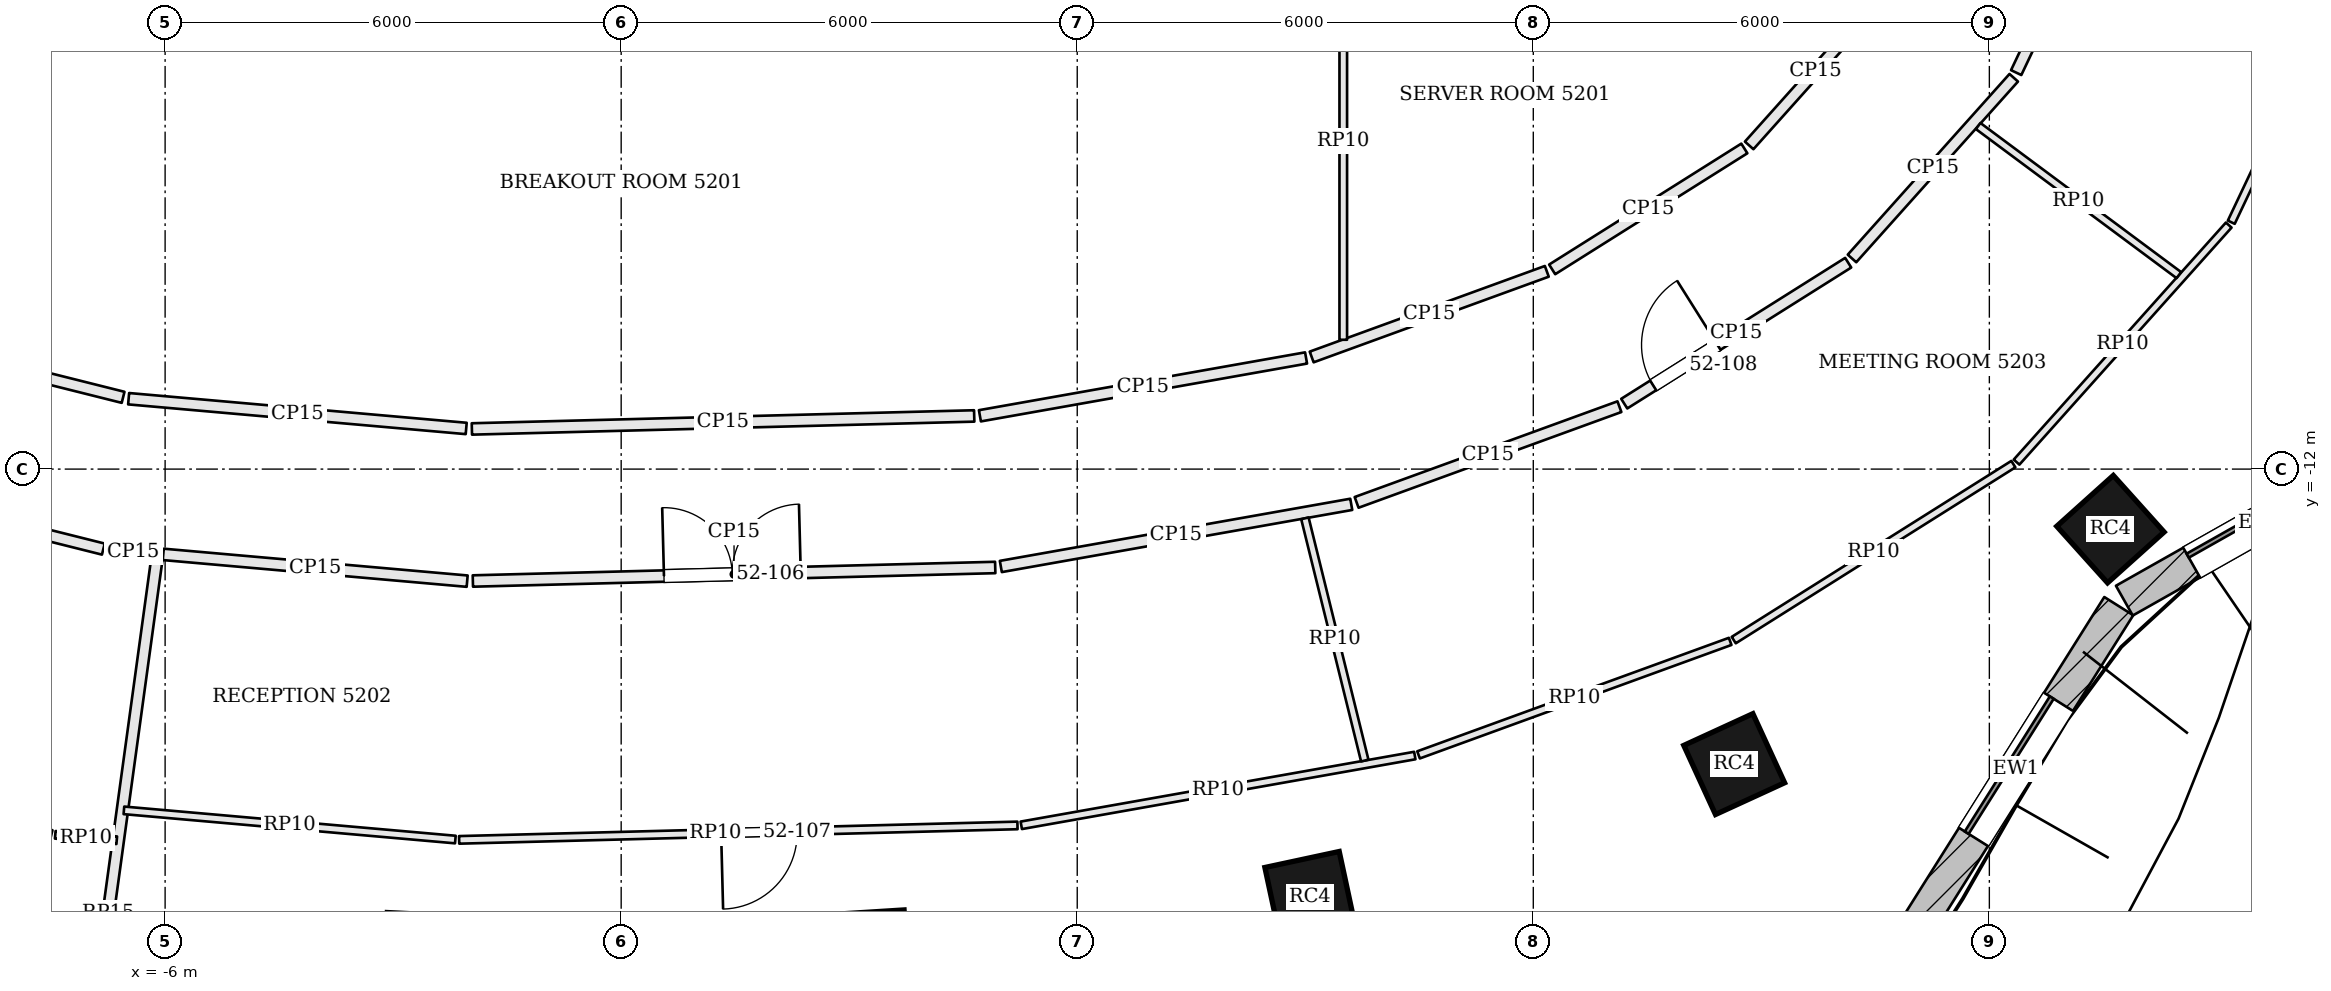
"""IFC4 building model, lengths in metres.
Left out: names, types, materials, properties, quantities, classifications, styles, units other than length and angle.
Written with IfcOpenShell. Run it as: python <this file> out.ifc"""

import sys

from ifc_helpers import new_model, si_unit, direction, frame, frame_2d, origin, origin_2d, place, context, subcontext, project, spatial, rectangle, extrude, element, fill, save


model = new_model("IFC4")
c1 = context("Model", 3, precision=1e-05, world=origin(), true_north=direction((0.0, 1.0)))
c2 = subcontext(c1, "Body", "Model", "MODEL_VIEW")
j1 = project(units=[si_unit("LENGTHUNIT", "METRE"), si_unit("PLANEANGLEUNIT", "RADIAN")], contexts=[c1])
p1 = place(None, origin())
s1 = spatial("IfcSite", under=j1, at=p1, CompositionType="ELEMENT")
p2 = place(p1, origin())
s2 = spatial("IfcBuilding", under=s1, at=p2, CompositionType="ELEMENT")
p3 = place(p2, frame((0.0, 0.0, 213.0)))
s3 = spatial("IfcBuildingStorey", under=s2, at=p3, CompositionType="ELEMENT", Elevation=213.0)
for number, where, z_axis, x_axis in (
    (1, (3.254, -18.33, 0.0), (0.0, 0.0, 1.0), (0.998, 0.063, 0.0)),
    (2, (9.063, -17.625, 0.0), (0.0, 0.0, 1.0), (0.978, 0.21, 0.0)),
    (3, (14.643, -15.881, 0.0), (0.0, 0.0, 1.0), (0.909, 0.417, 0.0)),
    (4, (19.593, -12.79, 0.0), (0.0, 0.0, 1.0), (0.744, 0.668, 0.0)),
):
    element("IfcColumn", number, at=place(p3, frame(where, z_axis=z_axis, x_axis=x_axis)), inside=s3, PredefinedType="COLUMN", context=c2, shape_type="SweptSolid", body=[
        extrude(rectangle(XDim=1.0, YDim=1.0, at=origin_2d()), origin(), (0.0, 0.0, 1.0), 3.9),
    ])
p4 = place(p3, frame((16.998, -18.099, 0.0), z_axis=(0.0, 0.0, 1.0), x_axis=(0.532745661304, 0.846275404559, 0.0)))
e5 = element("IfcWall", 5, at=p4, inside=s3, PredefinedType="SOLIDWALL", context=c2, shape_type="SweptSolid", body=[
    extrude(rectangle(XDim=5.076, YDim=0.45, at=frame_2d((2.538, 0.0))), origin(), (0.0, 0.0, 1.0), 3.6),
])
p5 = place(p4, frame((1.488, 0.0, 0.9)))
e6 = element("IfcOpeningElement", 6, at=p5, cuts=e5, PredefinedType="OPENING", context=c2, shape_type="SweptSolid", body=[
    extrude(rectangle(XDim=2.1, YDim=1.8, at=frame_2d((1.05, 0.9))), frame((0.0, 0.235, 0.0), z_axis=(0.0, -1.0, 0.0), x_axis=(1.0, 0.0, 0.0)), (0.0, 0.0, 1.0), 0.47),
])
p6 = place(p3, frame((19.776, -13.731, 0.0), z_axis=(0.0, 0.0, 1.0), x_axis=(0.870610133829, 0.491973571318, 0.0)))
e7 = element("IfcWall", 7, at=p6, inside=s3, PredefinedType="SOLIDWALL", context=c2, shape_type="SweptSolid", body=[
    extrude(rectangle(XDim=4.134, YDim=0.45, at=frame_2d((2.067, 0.0))), origin(), (0.0, 0.0, 1.0), 3.6),
])
p7 = place(p6, frame((1.017, 0.0, 0.9)))
e8 = element("IfcOpeningElement", 8, at=p7, cuts=e7, PredefinedType="OPENING", context=c2, shape_type="SweptSolid", body=[
    extrude(rectangle(XDim=2.1, YDim=1.8, at=frame_2d((1.05, 0.9))), frame((0.0, 0.235, 0.0), z_axis=(0.0, -1.0, 0.0), x_axis=(1.0, 0.0, 0.0)), (0.0, 0.0, 1.0), 0.47),
])
p8 = place(p3, frame((-11.319, -11.923, 0.0), z_axis=(0.0, 0.0, 1.0), x_axis=(0.969990815038, -0.243141561114, 0.0)))
e9 = element("IfcWall", 9, at=p8, inside=s3, PredefinedType="PARTITIONING", context=c2, shape_type="SweptSolid", body=[
    extrude(rectangle(XDim=4.645, YDim=0.15, at=frame_2d((2.323, 0.0))), origin(), (0.0, 0.0, 1.0), 2.984),
])
p9 = place(p8, frame((1.85, 0.0, 0.0)))
e10 = element("IfcOpeningElement", 10, at=p9, cuts=e9, PredefinedType="OPENING", context=c2, shape_type="SweptSolid", body=[
    extrude(rectangle(XDim=1.0, YDim=2.1, at=frame_2d((0.5, 1.05))), frame((0.0, 0.085, 0.0), z_axis=(0.0, -1.0, 0.0), x_axis=(1.0, 0.0, 0.0)), (0.0, 0.0, 1.0), 0.17),
])
p10 = place(p3, frame((-6.738, -13.059, 0.0), z_axis=(0.0, 0.0, 1.0), x_axis=(0.996163093105, -0.087516238126, 0.0)))
e11 = element("IfcWall", 11, at=p10, inside=s3, PredefinedType="PARTITIONING", context=c2, shape_type="SweptSolid", body=[
    extrude(rectangle(XDim=0.642, YDim=0.15, at=frame_2d((0.321, 0.0))), origin(), (0.0, 0.0, 1.0), 2.984),
])
p11 = place(p3, frame((-7.385, -22.485, 0.0), z_axis=(0.0, 0.0, 1.0), x_axis=(0.135958487289, 0.990714534936, 0.0)))
e12 = element("IfcWall", 12, at=p11, inside=s3, PredefinedType="PARTITIONING", context=c2, shape_type="SweptSolid", body=[
    extrude(rectangle(XDim=9.383, YDim=0.15, at=frame_2d((4.691, 0.0))), origin(), (0.0, 0.0, 1.0), 3.084),
])
p12 = place(p3, frame((-6.024, -13.122, 0.0), z_axis=(0.0, 0.0, 1.0), x_axis=(0.996140650131, -0.087771323084, 0.0)))
e13 = element("IfcWall", 13, at=p12, inside=s3, PredefinedType="PARTITIONING", context=c2, shape_type="SweptSolid", body=[
    extrude(rectangle(XDim=4.014, YDim=0.15, at=frame_2d((2.007, 0.0))), origin(), (0.0, 0.0, 1.0), 2.984),
])
p13 = place(p3, frame((-1.951, -13.472, 0.0), z_axis=(0.0, 0.0, 1.0), x_axis=(0.999663898238, 0.025924709429, 0.0)))
e14 = element("IfcWall", 14, at=p13, inside=s3, PredefinedType="PARTITIONING", context=c2, shape_type="SweptSolid", body=[
    extrude(rectangle(XDim=6.875, YDim=0.15, at=frame_2d((3.437, 0.0))), origin(), (0.0, 0.0, 1.0), 2.984),
])
p14 = place(p13, frame((2.515, 0.0, 0.0)))
e15 = element("IfcOpeningElement", 15, at=p14, cuts=e14, PredefinedType="OPENING", context=c2, shape_type="SweptSolid", body=[
    extrude(rectangle(XDim=1.8, YDim=2.1, at=frame_2d((0.9, 1.05))), frame((0.0, 0.085, 0.0), z_axis=(0.0, -1.0, 0.0), x_axis=(1.0, 0.0, 0.0)), (0.0, 0.0, 1.0), 0.17),
])
p15 = place(p3, frame((4.995, -13.281, 0.0), z_axis=(0.0, 0.0, 1.0), x_axis=(0.98463411377, 0.174630071865, 0.0)))
e16 = element("IfcWall", 16, at=p15, inside=s3, PredefinedType="PARTITIONING", context=c2, shape_type="SweptSolid", body=[
    extrude(rectangle(XDim=4.682, YDim=0.15, at=frame_2d((2.341, 0.0))), origin(), (0.0, 0.0, 1.0), 2.984),
])
p16 = place(p3, frame((9.676, -12.438, 0.0), z_axis=(0.0, 0.0, 1.0), x_axis=(0.939640289748, 0.342163887461, 0.0)))
e17 = element("IfcWall", 17, at=p16, inside=s3, PredefinedType="PARTITIONING", context=c2, shape_type="SweptSolid", body=[
    extrude(rectangle(XDim=3.68, YDim=0.15, at=frame_2d((1.84, 0.0))), origin(), (0.0, 0.0, 1.0), 2.984),
])
p17 = place(p3, frame((13.197, -11.139, 0.0), z_axis=(0.0, 0.0, 1.0), x_axis=(0.846390903833, 0.532562144644, 0.0)))
e18 = element("IfcWall", 18, at=p17, inside=s3, PredefinedType="PARTITIONING", context=c2, shape_type="SweptSolid", body=[
    extrude(rectangle(XDim=3.481, YDim=0.15, at=frame_2d((1.741, 0.0))), origin(), (0.0, 0.0, 1.0), 2.984),
])
p18 = place(p17, frame((0.45, 0.0, 0.0)))
e19 = element("IfcOpeningElement", 19, at=p18, cuts=e18, PredefinedType="OPENING", context=c2, shape_type="SweptSolid", body=[
    extrude(rectangle(XDim=1.0, YDim=2.4, at=frame_2d((0.5, 1.2))), frame((0.0, 0.085, 0.0), z_axis=(0.0, -1.0, 0.0), x_axis=(1.0, 0.0, 0.0)), (0.0, 0.0, 1.0), 0.17),
])
p19 = place(p3, frame((16.193, -9.229, 0.0), z_axis=(0.0, 0.0, 1.0), x_axis=(0.666882089048, 0.745163256815, 0.0)))
e20 = element("IfcWall", 20, at=p19, inside=s3, PredefinedType="PARTITIONING", context=c2, shape_type="SweptSolid", body=[
    extrude(rectangle(XDim=3.19, YDim=0.15, at=frame_2d((1.595, 0.0))), origin(), (0.0, 0.0, 1.0), 2.984),
])
p20 = place(p3, frame((18.353, -6.784, 0.0), z_axis=(0.0, 0.0, 1.0), x_axis=(0.428086344739, 0.903737838894, 0.0)))
e21 = element("IfcWall", 21, at=p20, inside=s3, PredefinedType="PARTITIONING", context=c2, shape_type="SweptSolid", body=[
    extrude(rectangle(XDim=2.3, YDim=0.15, at=frame_2d((1.15, 0.0))), origin(), (0.0, 0.0, 1.0), 2.984),
])
p21 = place(p3, frame((16.587, -5.789, 0.0), z_axis=(0.0, 0.0, 1.0), x_axis=(-0.666887460656, -0.745158449472, 0.0)))
e22 = element("IfcWall", 22, at=p21, inside=s3, PredefinedType="PARTITIONING", context=c2, shape_type="SweptSolid", body=[
    extrude(rectangle(XDim=2.62, YDim=0.15, at=frame_2d((1.31, 0.0))), origin(), (0.0, 0.0, 1.0), 2.984),
])
p22 = place(p3, frame((14.777, -7.781, 0.0), z_axis=(0.0, 0.0, 1.0), x_axis=(-0.846359741043, -0.532611667862, 0.0)))
e23 = element("IfcWall", 23, at=p22, inside=s3, PredefinedType="PARTITIONING", context=c2, shape_type="SweptSolid", body=[
    extrude(rectangle(XDim=2.987, YDim=0.15, at=frame_2d((1.494, 0.0))), origin(), (0.0, 0.0, 1.0), 2.984),
])
p23 = place(p3, frame((12.178, -9.398, 0.0), z_axis=(0.0, 0.0, 1.0), x_axis=(-0.939609240084, -0.342249143093, 0.0)))
e24 = element("IfcWall", 24, at=p23, inside=s3, PredefinedType="PARTITIONING", context=c2, shape_type="SweptSolid", body=[
    extrude(rectangle(XDim=3.292, YDim=0.15, at=frame_2d((1.646, 0.0))), origin(), (0.0, 0.0, 1.0), 2.984),
])
p24 = place(p3, frame((9.01, -10.538, 0.0), z_axis=(0.0, 0.0, 1.0), x_axis=(-0.984645638575, -0.174565077936, 0.0)))
e25 = element("IfcWall", 25, at=p24, inside=s3, PredefinedType="PARTITIONING", context=c2, shape_type="SweptSolid", body=[
    extrude(rectangle(XDim=4.358, YDim=0.15, at=frame_2d((2.179, 0.0))), origin(), (0.0, 0.0, 1.0), 2.984),
])
p25 = place(p3, frame((4.645, -11.301, 0.0), z_axis=(0.0, 0.0, 1.0), x_axis=(-0.9996648469, -0.02588810291, 0.0)))
e26 = element("IfcWall", 26, at=p25, inside=s3, PredefinedType="PARTITIONING", context=c2, shape_type="SweptSolid", body=[
    extrude(rectangle(XDim=6.611, YDim=0.15, at=frame_2d((3.305, 0.0))), origin(), (0.0, 0.0, 1.0), 2.984),
])
p26 = place(p3, frame((-2.039, -11.465, 0.0), z_axis=(0.0, 0.0, 1.0), x_axis=(-0.996139855484, 0.087780341286, 0.0)))
e27 = element("IfcWall", 27, at=p26, inside=s3, PredefinedType="PARTITIONING", context=c2, shape_type="SweptSolid", body=[
    extrude(rectangle(XDim=4.458, YDim=0.15, at=frame_2d((2.229, 0.0))), origin(), (0.0, 0.0, 1.0), 2.984),
])
p27 = place(p3, frame((-6.553, -11.056, 0.0), z_axis=(0.0, 0.0, 1.0), x_axis=(-0.970004917182, 0.243085294995, 0.0)))
e28 = element("IfcWall", 28, at=p27, inside=s3, PredefinedType="PARTITIONING", context=c2, shape_type="SweptSolid", body=[
    extrude(rectangle(XDim=4.284, YDim=0.15, at=frame_2d((2.142, 0.0))), origin(), (0.0, 0.0, 1.0), 2.984),
])
p28 = place(p3, frame((-6.636, -16.883, 0.0), z_axis=(0.0, 0.0, 1.0), x_axis=(-0.996140679017, 0.087770995254, 0.0)))
e29 = element("IfcWall", 29, at=p28, inside=s3, PredefinedType="PARTITIONING", context=c2, shape_type="SweptSolid", body=[
    extrude(rectangle(XDim=0.812, YDim=0.1, at=frame_2d((0.406, 0.0))), origin(), (0.0, 0.0, 1.0), 2.984),
])
p29 = place(p3, frame((22.537, -5.893, 0.0), z_axis=(0.0, 0.0, 1.0), x_axis=(-0.428099612517, -0.903731554037, 0.0)))
e30 = element("IfcWall", 30, at=p29, inside=s3, PredefinedType="PARTITIONING", context=c2, shape_type="SweptSolid", body=[
    extrude(rectangle(XDim=3.164, YDim=0.1, at=frame_2d((1.582, 0.0))), origin(), (0.0, 0.0, 1.0), 2.984),
])
p30 = place(p3, frame((21.149, -8.789, 0.0), z_axis=(0.0, 0.0, 1.0), x_axis=(-0.666915902537, -0.745132994132, 0.0)))
e31 = element("IfcWall", 31, at=p30, inside=s3, PredefinedType="PARTITIONING", context=c2, shape_type="SweptSolid", body=[
    extrude(rectangle(XDim=4.186, YDim=0.1, at=frame_2d((2.093, 0.0))), origin(), (0.0, 0.0, 1.0), 2.984),
])
p31 = place(p3, frame((18.316, -11.935, 0.0), z_axis=(0.0, 0.0, 1.0), x_axis=(-0.84637539713, -0.532586788358, 0.0)))
e32 = element("IfcWall", 32, at=p31, inside=s3, PredefinedType="PARTITIONING", context=c2, shape_type="SweptSolid", body=[
    extrude(rectangle(XDim=4.346, YDim=0.1, at=frame_2d((2.173, 0.0))), origin(), (0.0, 0.0, 1.0), 2.984),
])
p32 = place(p3, frame((14.59, -14.267, 0.0), z_axis=(0.0, 0.0, 1.0), x_axis=(-0.939623405418, -0.342210251148, 0.0)))
e33 = element("IfcWall", 33, at=p32, inside=s3, PredefinedType="PARTITIONING", context=c2, shape_type="SweptSolid", body=[
    extrude(rectangle(XDim=4.363, YDim=0.1, at=frame_2d((2.182, 0.0))), origin(), (0.0, 0.0, 1.0), 2.984),
])
p33 = place(p3, frame((10.441, -15.769, 0.0), z_axis=(0.0, 0.0, 1.0), x_axis=(-0.984642067447, -0.174585219919, 0.0)))
e34 = element("IfcWall", 34, at=p33, inside=s3, PredefinedType="PARTITIONING", context=c2, shape_type="SweptSolid", body=[
    extrude(rectangle(XDim=5.258, YDim=0.1, at=frame_2d((2.629, 0.0))), origin(), (0.0, 0.0, 1.0), 2.984),
])
p34 = place(p3, frame((5.214, -16.688, 0.0), z_axis=(0.0, 0.0, 1.0), x_axis=(-0.999664981446, -0.025882906921, 0.0)))
e35 = element("IfcWall", 35, at=p34, inside=s3, PredefinedType="PARTITIONING", context=c2, shape_type="SweptSolid", body=[
    extrude(rectangle(XDim=7.348, YDim=0.1, at=frame_2d((3.674, 0.0))), origin(), (0.0, 0.0, 1.0), 2.984),
])
p35 = place(p34, frame((2.9, 0.0, 0.0)))
e36 = element("IfcOpeningElement", 36, at=p35, cuts=e35, PredefinedType="OPENING", context=c2, shape_type="SweptSolid", body=[
    extrude(rectangle(XDim=1.0, YDim=2.1, at=frame_2d((0.5, 1.05))), frame((0.0, 0.06, 0.0), z_axis=(0.0, -1.0, 0.0), x_axis=(1.0, 0.0, 0.0)), (0.0, 0.0, 1.0), 0.12),
])
p36 = place(p3, frame((-2.181, -16.874, 0.0), z_axis=(0.0, 0.0, 1.0), x_axis=(-0.996144341977, 0.087729413243, 0.0)))
e37 = element("IfcWall", 37, at=p36, inside=s3, PredefinedType="PARTITIONING", context=c2, shape_type="SweptSolid", body=[
    extrude(rectangle(XDim=4.377, YDim=0.1, at=frame_2d((2.189, 0.0))), origin(), (0.0, 0.0, 1.0), 2.984),
])
p37 = place(p3, frame((8.995, -12.648, 0.0), z_axis=(0.0, 0.0, 1.0), x_axis=(0.239839908092, -0.970812452787, 0.0)))
e38 = element("IfcWall", 38, at=p37, inside=s3, PredefinedType="PARTITIONING", context=c2, shape_type="SweptSolid", body=[
    extrude(rectangle(XDim=3.283, YDim=0.1, at=frame_2d((1.641, 0.0))), origin(), (0.0, 0.0, 1.0), 2.984),
])
p38 = place(p3, frame((17.853, -7.487, 0.0), z_axis=(0.0, 0.0, 1.0), x_axis=(0.802681916891, -0.596407361034, 0.0)))
e39 = element("IfcWall", 39, at=p38, inside=s3, PredefinedType="PARTITIONING", context=c2, shape_type="SweptSolid", body=[
    extrude(rectangle(XDim=3.289, YDim=0.1, at=frame_2d((1.645, 0.0))), origin(), (0.0, 0.0, 1.0), 2.984),
])
p39 = place(p3, frame((9.5, -10.299, 0.0), z_axis=(0.0, 0.0, 1.0), x_axis=(0.0, 1.0, 0.0)))
e40 = element("IfcWall", 40, at=p39, inside=s3, PredefinedType="PARTITIONING", context=c2, shape_type="SweptSolid", body=[
    extrude(rectangle(XDim=5.224, YDim=0.1, at=frame_2d((2.612, 0.0))), origin(), (0.0, 0.0, 1.0), 2.984),
])
p40 = place(p5, origin())
e41 = element("IfcWindow", 41, at=p40, inside=s3, PartitioningType="SINGLE_PANEL", PredefinedType="WINDOW", context=c2, shape_type="SweptSolid", body=[
    extrude(rectangle(XDim=2.1, YDim=1.8, at=frame_2d((1.05, 0.9))), frame((0.0, 0.135, 0.0), z_axis=(0.0, -1.0, 0.0), x_axis=(1.0, 0.0, 0.0)), (0.0, 0.0, 1.0), 0.06),
])
fill(e6, e41)
p41 = place(p7, origin())
e42 = element("IfcWindow", 42, at=p41, inside=s3, PartitioningType="SINGLE_PANEL", PredefinedType="WINDOW", context=c2, shape_type="SweptSolid", body=[
    extrude(rectangle(XDim=2.1, YDim=1.8, at=frame_2d((1.05, 0.9))), frame((0.0, 0.135, 0.0), z_axis=(0.0, -1.0, 0.0), x_axis=(1.0, 0.0, 0.0)), (0.0, 0.0, 1.0), 0.06),
])
fill(e8, e42)
p42 = place(p14, origin())
e43 = element("IfcDoor", 43, at=p42, inside=s3, OperationType="DOUBLE_DOOR_SINGLE_SWING", PredefinedType="DOOR", context=c2, shape_type="SweptSolid", body=[
    extrude(rectangle(XDim=1.8, YDim=2.1, at=frame_2d((0.9, 1.05))), frame((0.0, 0.025, 0.0), z_axis=(0.0, -1.0, 0.0), x_axis=(1.0, 0.0, 0.0)), (0.0, 0.0, 1.0), 0.05),
])
fill(e15, e43)
p43 = place(p35, origin())
e44 = element("IfcDoor", 44, at=p43, inside=s3, OperationType="SINGLE_SWING_RIGHT", PredefinedType="DOOR", context=c2, shape_type="SweptSolid", body=[
    extrude(rectangle(XDim=1.0, YDim=2.1, at=frame_2d((0.5, 1.05))), frame((0.0, 0.025, 0.0), z_axis=(0.0, -1.0, 0.0), x_axis=(1.0, 0.0, 0.0)), (0.0, 0.0, 1.0), 0.05),
])
fill(e36, e44)
p44 = place(p18, origin())
e45 = element("IfcDoor", 45, at=p44, inside=s3, OperationType="SINGLE_SWING_RIGHT", PredefinedType="DOOR", context=c2, shape_type="SweptSolid", body=[
    extrude(rectangle(XDim=1.0, YDim=2.4, at=frame_2d((0.5, 1.2))), frame((0.0, 0.025, 0.0), z_axis=(0.0, -1.0, 0.0), x_axis=(1.0, 0.0, 0.0)), (0.0, 0.0, 1.0), 0.05),
])
fill(e19, e45)
save(model, sys.argv[1])
